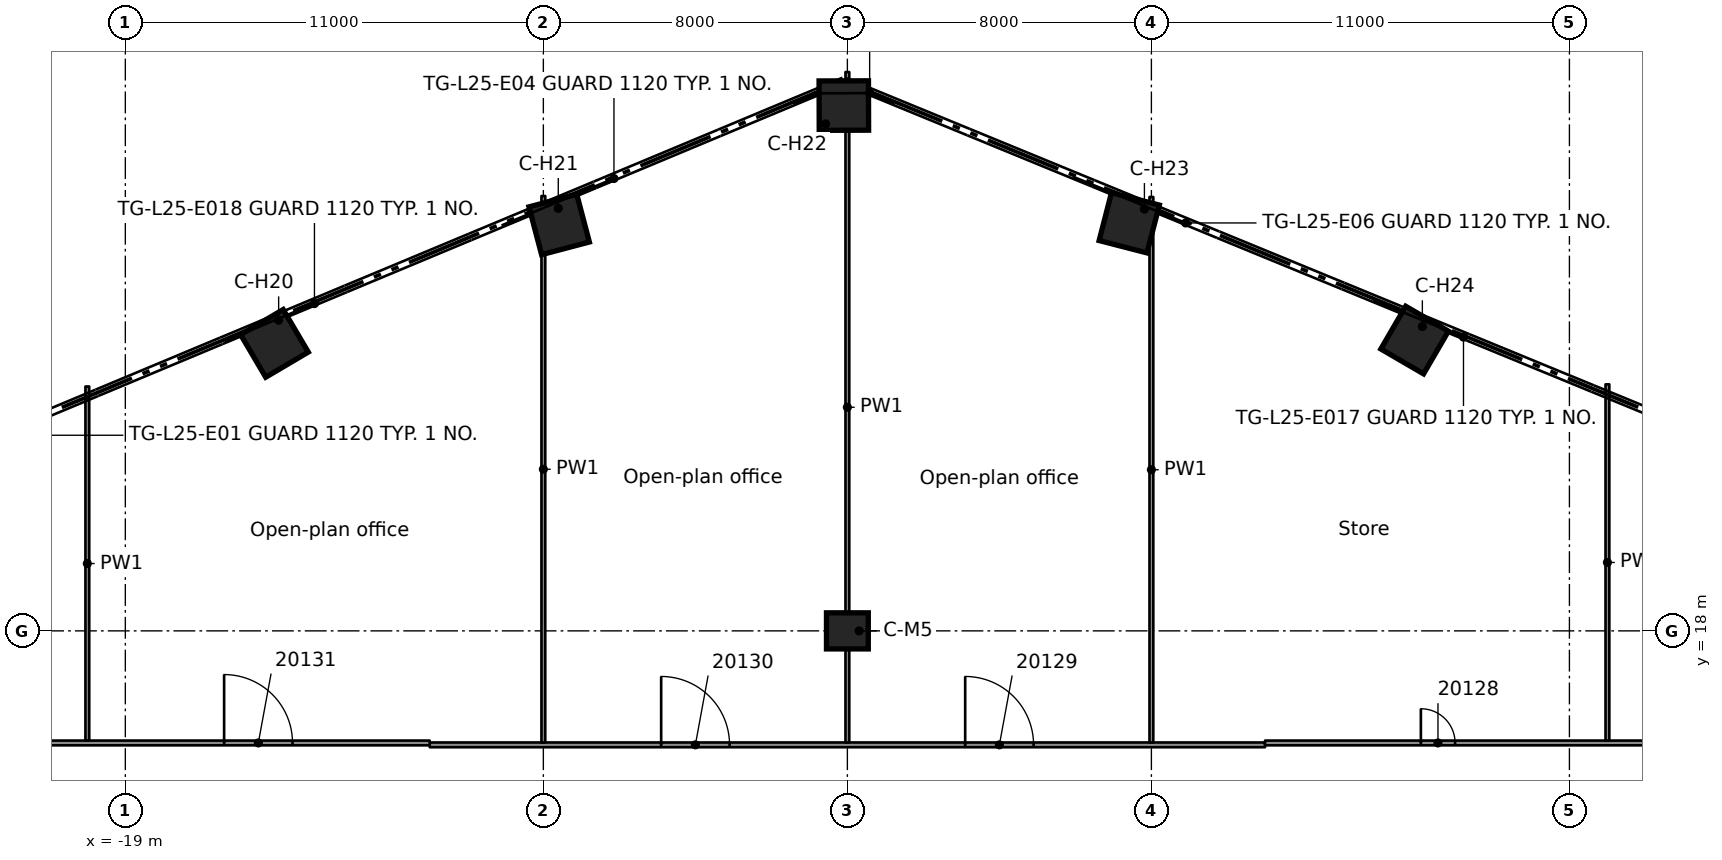
"""IFC4 building model, lengths in metres.
Left out: names, types, materials, properties, quantities, classifications, styles, units other than length and angle.
Written with IfcOpenShell. Run it as: python <this file> out.ifc"""

import sys

from ifc_helpers import new_model, si_unit, direction, frame, frame_2d, origin, origin_2d, place, context, subcontext, project, spatial, rectangle, extrude, element, fill, save


model = new_model("IFC4")
c1 = context("Model", 3, precision=1e-05, world=origin(), true_north=direction((0.0, 1.0)))
c2 = subcontext(c1, "Body", "Model", "MODEL_VIEW")
j1 = project(units=[si_unit("LENGTHUNIT", "METRE"), si_unit("PLANEANGLEUNIT", "RADIAN")], contexts=[c1])
p1 = place(None, origin())
s1 = spatial("IfcSite", under=j1, at=p1, CompositionType="ELEMENT")
p2 = place(p1, origin())
s2 = spatial("IfcBuilding", under=s1, at=p2, CompositionType="ELEMENT")
p3 = place(p2, frame((0.0, 0.0, 102.2)))
s3 = spatial("IfcBuildingStorey", under=s2, at=p3, CompositionType="ELEMENT", Elevation=102.2)
for number, where, z_axis, x_axis in (
    (1, (-15.076, 25.565, 0.0), (0.0, 0.0, 1.0), (-0.508, 0.861, 0.0)),
    (2, (-7.584, 28.694, 0.0), (0.0, 0.0, 1.0), (-0.256, 0.967, 0.0)),
    (3, (-0.093, 31.822, 0.0), (0.0, 0.0, 1.0), (-0.003, 1.0, 0.0)),
    (4, (7.417, 28.737, 0.0), (0.0, 0.0, 1.0), (0.25, 0.968, 0.0)),
    (5, (14.927, 25.652, 0.0), (0.0, 0.0, 1.0), (0.503, 0.864, 0.0)),
):
    element("IfcColumn", number, at=place(p3, frame(where, z_axis=z_axis, x_axis=x_axis)), inside=s3, PredefinedType="COLUMN", context=c2, shape_type="SweptSolid", body=[
        extrude(rectangle(XDim=1.3, YDim=1.3, at=origin_2d()), origin(), (0.0, 0.0, 1.0), 3.5),
    ])
p4 = place(p3, frame((0.0, 18.0, 0.0), z_axis=(0.0, 0.0, 1.0), x_axis=(1.0, 0.0, 0.0)))
e6 = element("IfcColumn", 6, at=p4, inside=s3, PredefinedType="COLUMN", context=c2, shape_type="SweptSolid", body=[
    extrude(rectangle(XDim=1.1, YDim=0.95, at=origin_2d()), origin(), (0.0, 0.0, 1.0), 3.5),
])
p5 = place(p3, frame((-10.99, 15.001, 0.0), z_axis=(0.0, 0.0, 1.0), x_axis=(1.0, 0.0, 0.0)))
e7 = element("IfcWall", 7, at=p5, inside=s3, PredefinedType="PARTITIONING", context=c2, shape_type="SweptSolid", body=[
    extrude(rectangle(XDim=21.98, YDim=0.125, at=frame_2d((10.99, 0.0))), origin(), (0.0, 0.0, 1.0), 3.08),
])
p6 = place(p5, frame((14.09, 0.0, 0.0)))
e8 = element("IfcOpeningElement", 8, at=p6, cuts=e7, PredefinedType="OPENING", context=c2, shape_type="SweptSolid", body=[
    extrude(rectangle(XDim=1.8, YDim=2.1, at=frame_2d((0.9, 1.05))), frame((0.0, 0.073, 0.0), z_axis=(0.0, -1.0, 0.0), x_axis=(1.0, 0.0, 0.0)), (0.0, 0.0, 1.0), 0.145),
])
p7 = place(p5, frame((6.09, 0.0, 0.0)))
e9 = element("IfcOpeningElement", 9, at=p7, cuts=e7, PredefinedType="OPENING", context=c2, shape_type="SweptSolid", body=[
    extrude(rectangle(XDim=1.8, YDim=2.1, at=frame_2d((0.9, 1.05))), frame((0.0, 0.073, 0.0), z_axis=(0.0, -1.0, 0.0), x_axis=(1.0, 0.0, 0.0)), (0.0, 0.0, 1.0), 0.145),
])
p8 = place(p3, frame((-21.988, 15.051, 0.0), z_axis=(0.0, 0.0, 1.0), x_axis=(1.0, 0.0, 0.0)))
e10 = element("IfcWall", 10, at=p8, inside=s3, PredefinedType="PARTITIONING", context=c2, shape_type="SweptSolid", body=[
    extrude(rectangle(XDim=10.997, YDim=0.125, at=frame_2d((5.499, 0.0))), origin(), (0.0, 0.0, 1.0), 3.08),
])
p9 = place(p8, frame((5.587, 0.0, 0.0)))
e11 = element("IfcOpeningElement", 11, at=p9, cuts=e10, PredefinedType="OPENING", context=c2, shape_type="SweptSolid", body=[
    extrude(rectangle(XDim=1.8, YDim=2.1, at=frame_2d((0.9, 1.05))), frame((0.0, 0.073, 0.0), z_axis=(0.0, -1.0, 0.0), x_axis=(1.0, 0.0, 0.0)), (0.0, 0.0, 1.0), 0.145),
])
p10 = place(p3, frame((10.991, 15.051, 0.0), z_axis=(0.0, 0.0, 1.0), x_axis=(1.0, 0.0, 0.0)))
e12 = element("IfcWall", 12, at=p10, inside=s3, PredefinedType="PARTITIONING", context=c2, shape_type="SweptSolid", body=[
    extrude(rectangle(XDim=10.997, YDim=0.125, at=frame_2d((5.499, 0.0))), origin(), (0.0, 0.0, 1.0), 3.08),
])
p11 = place(p10, frame((4.1, 0.0, 0.0)))
e13 = element("IfcOpeningElement", 13, at=p11, cuts=e12, PredefinedType="OPENING", context=c2, shape_type="SweptSolid", body=[
    extrude(rectangle(XDim=0.9, YDim=2.1, at=frame_2d((0.45, 1.05))), frame((0.0, 0.073, 0.0), z_axis=(0.0, -1.0, 0.0), x_axis=(1.0, 0.0, 0.0)), (0.0, 0.0, 1.0), 0.145),
])
p12 = place(p3, frame((20.0, 15.114, 0.0), z_axis=(0.0, 0.0, 1.0), x_axis=(0.0, 1.0, 0.0)))
e14 = element("IfcWall", 14, at=p12, inside=s3, PredefinedType="PARTITIONING", context=c2, shape_type="SweptSolid", body=[
    extrude(rectangle(XDim=9.373, YDim=0.1, at=frame_2d((4.687, 0.0))), origin(), (0.0, 0.0, 1.0), 3.08),
])
p13 = place(p3, frame((8.0, 15.063, 0.0), z_axis=(0.0, 0.0, 1.0), x_axis=(0.0, 1.0, 0.0)))
e15 = element("IfcWall", 15, at=p13, inside=s3, PredefinedType="PARTITIONING", context=c2, shape_type="SweptSolid", body=[
    extrude(rectangle(XDim=14.354, YDim=0.1, at=frame_2d((7.177, 0.0))), origin(), (0.0, 0.0, 1.0), 3.08),
])
p14 = place(p3, frame((0.0, 15.063, 0.0), z_axis=(0.0, 0.0, 1.0), x_axis=(0.0, 1.0, 0.0)))
e16 = element("IfcWall", 16, at=p14, inside=s3, PredefinedType="PARTITIONING", context=c2, shape_type="SweptSolid", body=[
    extrude(rectangle(XDim=17.641, YDim=0.1, at=frame_2d((8.821, 0.0))), origin(), (0.0, 0.0, 1.0), 3.08),
])
p15 = place(p3, frame((-8.0, 15.063, 0.0), z_axis=(0.0, 0.0, 1.0), x_axis=(0.0, 1.0, 0.0)))
e17 = element("IfcWall", 17, at=p15, inside=s3, PredefinedType="PARTITIONING", context=c2, shape_type="SweptSolid", body=[
    extrude(rectangle(XDim=14.379, YDim=0.1, at=frame_2d((7.189, 0.0))), origin(), (0.0, 0.0, 1.0), 3.08),
])
p16 = place(p3, frame((-20.0, 15.114, 0.0), z_axis=(0.0, 0.0, 1.0), x_axis=(0.0, 1.0, 0.0)))
e18 = element("IfcWall", 18, at=p16, inside=s3, PredefinedType="PARTITIONING", context=c2, shape_type="SweptSolid", body=[
    extrude(rectangle(XDim=9.316, YDim=0.1, at=frame_2d((4.658, 0.0))), origin(), (0.0, 0.0, 1.0), 3.08),
])
p17 = place(p11, origin())
e19 = element("IfcDoor", 19, at=p17, inside=s3, OperationType="SINGLE_SWING_LEFT", PredefinedType="DOOR", context=c2, shape_type="SweptSolid", body=[
    extrude(rectangle(XDim=0.9, YDim=2.1, at=frame_2d((0.45, 1.05))), frame((0.0, 0.025, 0.0), z_axis=(0.0, -1.0, 0.0), x_axis=(1.0, 0.0, 0.0)), (0.0, 0.0, 1.0), 0.05),
])
fill(e13, e19)
p18 = place(p6, origin())
e20 = element("IfcDoor", 20, at=p18, inside=s3, OperationType="DOUBLE_DOOR_SINGLE_SWING", PredefinedType="DOOR", context=c2, shape_type="SweptSolid", body=[
    extrude(rectangle(XDim=1.8, YDim=2.1, at=frame_2d((0.9, 1.05))), frame((0.0, 0.025, 0.0), z_axis=(0.0, -1.0, 0.0), x_axis=(1.0, 0.0, 0.0)), (0.0, 0.0, 1.0), 0.05),
])
fill(e8, e20)
p19 = place(p7, origin())
e21 = element("IfcDoor", 21, at=p19, inside=s3, OperationType="DOUBLE_DOOR_SINGLE_SWING", PredefinedType="DOOR", context=c2, shape_type="SweptSolid", body=[
    extrude(rectangle(XDim=1.8, YDim=2.1, at=frame_2d((0.9, 1.05))), frame((0.0, 0.025, 0.0), z_axis=(0.0, -1.0, 0.0), x_axis=(1.0, 0.0, 0.0)), (0.0, 0.0, 1.0), 0.05),
])
fill(e9, e21)
p20 = place(p9, origin())
e22 = element("IfcDoor", 22, at=p20, inside=s3, OperationType="DOUBLE_DOOR_SINGLE_SWING", PredefinedType="DOOR", context=c2, shape_type="SweptSolid", body=[
    extrude(rectangle(XDim=1.8, YDim=2.1, at=frame_2d((0.9, 1.05))), frame((0.0, 0.025, 0.0), z_axis=(0.0, -1.0, 0.0), x_axis=(1.0, 0.0, 0.0)), (0.0, 0.0, 1.0), 0.05),
])
fill(e11, e22)
save(model, sys.argv[1])
